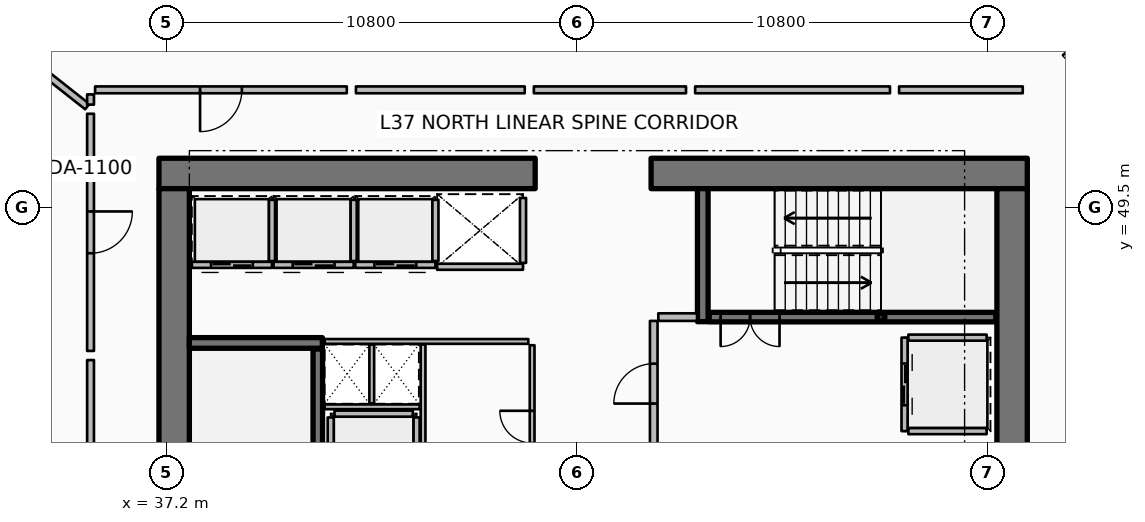
"""IFC4 building model, lengths in metres.
Left out: names, types, materials, properties, quantities, classifications, styles, units other than length and angle.
Written with IfcOpenShell. Run it as: python <this file> out.ifc"""

import sys

from ifc_helpers import new_model, si_unit, direction, frame, frame_2d, origin, origin_2d, place, context, subcontext, project, spatial, rectangle, hollow_rectangle, extrude, element, fill, save


model = new_model("IFC4")
c1 = context("Model", 3, precision=1e-05, world=origin(), true_north=direction((0.0, 1.0)))
c2 = subcontext(c1, "Body", "Model", "MODEL_VIEW")
j1 = project(units=[si_unit("LENGTHUNIT", "METRE"), si_unit("PLANEANGLEUNIT", "RADIAN")], contexts=[c1])
p1 = place(None, origin())
s1 = spatial("IfcSite", under=j1, at=p1, CompositionType="ELEMENT")
p2 = place(p1, origin())
s2 = spatial("IfcBuilding", under=s1, at=p2, CompositionType="ELEMENT")
p3 = place(p2, frame((0.0, 0.0, 150.3)))
s3 = spatial("IfcBuildingStorey", under=s2, at=p3, CompositionType="ELEMENT", Elevation=150.3)
p4 = place(p3, frame((37.0, 50.4, 0.0), z_axis=(0.0, 0.0, 1.0), x_axis=(1.0, 0.0, 0.0)))
e1 = element("IfcWall", 1, at=p4, inside=s3, PredefinedType="SHEAR", context=c2, shape_type="SweptSolid", body=[
    extrude(rectangle(XDim=9.9, YDim=0.8, at=frame_2d((4.95, 0.0))), origin(), (0.0, 0.0, 1.0), 3.75),
])
p5 = place(p3, frame((49.95, 50.4, 0.0), z_axis=(0.0, 0.0, 1.0), x_axis=(1.0, 0.0, 0.0)))
e2 = element("IfcWall", 2, at=p5, inside=s3, PredefinedType="SHEAR", context=c2, shape_type="SweptSolid", body=[
    extrude(rectangle(XDim=9.9, YDim=0.8, at=frame_2d((4.95, 0.0))), origin(), (0.0, 0.0, 1.0), 3.75),
])
for number, where, z_axis, x_axis in (
    (3, (37.4, 34.0, 0.0), (0.0, 0.0, 1.0), (0.0, 1.0, 0.0)),
    (4, (59.45, 34.0, 0.0), (0.0, 0.0, 1.0), (0.0, 1.0, 0.0)),
):
    element("IfcWall", number, at=place(p3, frame(where, z_axis=z_axis, x_axis=x_axis)), inside=s3, PredefinedType="SHEAR", context=c2, shape_type="SweptSolid", body=[
        extrude(rectangle(XDim=16.0, YDim=0.8, at=frame_2d((8.0, 0.0))), origin(), (0.0, 0.0, 1.0), 3.75),
    ])
for number, where, z_axis, x_axis in (
    (5, (37.8, 45.94, 0.0), (0.0, 0.0, 1.0), (1.0, 0.0, 0.0)),
    (6, (51.31, 46.5, 0.0), (0.0, 0.0, 1.0), (0.0, 1.0, 0.0)),
):
    element("IfcWall", number, at=place(p3, frame(where, z_axis=z_axis, x_axis=x_axis)), inside=s3, PredefinedType="SHEAR", context=c2, shape_type="SweptSolid", body=[
        extrude(rectangle(XDim=3.5, YDim=0.28, at=frame_2d((1.75, 0.0))), origin(), (0.0, 0.0, 1.0), 3.75),
    ])
p6 = place(p3, frame((56.0, 46.62, 0.0), z_axis=(0.0, 0.0, 1.0), x_axis=(1.0, 0.0, 0.0)))
e7 = element("IfcColumn", 7, at=p6, inside=s3, PredefinedType="COLUMN", context=c2, shape_type="SweptSolid", body=[
    extrude(hollow_rectangle(XDim=0.2, YDim=0.2, WallThickness=0.01, InnerFilletRadius=0.01, OuterFilletRadius=0.02, at=origin_2d()), origin(), (0.0, 0.0, 1.0), 1.67),
])
p7 = place(p3, frame((41.18, 38.22, 0.0), z_axis=(0.0, 0.0, 1.0), x_axis=(0.0, 1.0, 0.0)))
e8 = element("IfcWall", 8, at=p7, inside=s3, PredefinedType="SOLIDWALL", context=c2, shape_type="SweptSolid", body=[
    extrude(rectangle(XDim=7.56, YDim=0.25, at=frame_2d((3.78, 0.0))), origin(), (0.0, 0.0, 1.0), 3.5),
])
p8 = place(p7, frame((0.3, 0.0, 0.0)))
e9 = element("IfcOpeningElement", 9, at=p8, cuts=e8, PredefinedType="OPENING", context=c2, shape_type="SweptSolid", body=[
    extrude(rectangle(XDim=1.55, YDim=2.15, at=frame_2d((0.775, 1.075))), frame((0.0, 0.135, 0.0), z_axis=(0.0, -1.0, 0.0), x_axis=(1.0, 0.0, 0.0)), (0.0, 0.0, 1.0), 0.27),
])
p9 = place(p3, frame((51.48, 46.62, 0.0), z_axis=(0.0, 0.0, 1.0), x_axis=(1.0, 0.0, 0.0)))
e10 = element("IfcWall", 10, at=p9, inside=s3, PredefinedType="SOLIDWALL", context=c2, shape_type="SweptSolid", body=[
    extrude(rectangle(XDim=7.54, YDim=0.25, at=frame_2d((3.77, 0.0))), origin(), (0.0, 0.0, 1.0), 3.5),
])
p10 = place(p9, frame((0.3, 0.0, 0.0)))
e11 = element("IfcOpeningElement", 11, at=p10, cuts=e10, PredefinedType="OPENING", context=c2, shape_type="SweptSolid", body=[
    extrude(rectangle(XDim=1.55, YDim=2.15, at=frame_2d((0.775, 1.075))), frame((0.0, 0.135, 0.0), z_axis=(0.0, -1.0, 0.0), x_axis=(1.0, 0.0, 0.0)), (0.0, 0.0, 1.0), 0.27),
])
p11 = place(p3, frame((39.975, 47.995, 0.0), z_axis=(0.0, 0.0, 1.0), x_axis=(-1.0, 0.0, 0.0)))
e12 = element("IfcWall", 12, at=p11, inside=s3, PredefinedType="PARTITIONING", context=c2, shape_type="SweptSolid", body=[
    extrude(rectangle(XDim=2.11, YDim=0.16, at=frame_2d((1.055, 0.0))), origin(), (0.0, 0.0, 1.0), 3.5),
])
p12 = place(p11, frame((0.505, 0.0, 0.0)))
e13 = element("IfcOpeningElement", 13, at=p12, cuts=e12, PredefinedType="OPENING", context=c2, shape_type="SweptSolid", body=[
    extrude(rectangle(XDim=1.1, YDim=2.1, at=frame_2d((0.55, 1.05))), frame((0.0, 0.09, 0.0), z_axis=(0.0, -1.0, 0.0), x_axis=(1.0, 0.0, 0.0)), (0.0, 0.0, 1.0), 0.18),
])
p13 = place(p3, frame((39.975, 48.095, 0.0), z_axis=(0.0, 0.0, 1.0), x_axis=(0.0, 1.0, 0.0)))
e14 = element("IfcWall", 14, at=p13, inside=s3, PredefinedType="PARTITIONING", context=c2, shape_type="SweptSolid", body=[
    extrude(rectangle(XDim=1.61, YDim=0.16, at=frame_2d((0.805, 0.0))), origin(), (0.0, 0.0, 1.0), 3.5),
])
p14 = place(p3, frame((42.125, 47.995, 0.0), z_axis=(0.0, 0.0, 1.0), x_axis=(-1.0, 0.0, 0.0)))
e15 = element("IfcWall", 15, at=p14, inside=s3, PredefinedType="PARTITIONING", context=c2, shape_type="SweptSolid", body=[
    extrude(rectangle(XDim=2.11, YDim=0.16, at=frame_2d((1.055, 0.0))), origin(), (0.0, 0.0, 1.0), 3.5),
])
p15 = place(p14, frame((0.505, 0.0, 0.0)))
e16 = element("IfcOpeningElement", 16, at=p15, cuts=e15, PredefinedType="OPENING", context=c2, shape_type="SweptSolid", body=[
    extrude(rectangle(XDim=1.1, YDim=2.1, at=frame_2d((0.55, 1.05))), frame((0.0, 0.09, 0.0), z_axis=(0.0, -1.0, 0.0), x_axis=(1.0, 0.0, 0.0)), (0.0, 0.0, 1.0), 0.18),
])
p16 = place(p3, frame((42.125, 48.095, 0.0), z_axis=(0.0, 0.0, 1.0), x_axis=(0.0, 1.0, 0.0)))
e17 = element("IfcWall", 17, at=p16, inside=s3, PredefinedType="PARTITIONING", context=c2, shape_type="SweptSolid", body=[
    extrude(rectangle(XDim=1.61, YDim=0.16, at=frame_2d((0.805, 0.0))), origin(), (0.0, 0.0, 1.0), 3.5),
])
p17 = place(p3, frame((44.275, 47.995, 0.0), z_axis=(0.0, 0.0, 1.0), x_axis=(-1.0, 0.0, 0.0)))
e18 = element("IfcWall", 18, at=p17, inside=s3, PredefinedType="PARTITIONING", context=c2, shape_type="SweptSolid", body=[
    extrude(rectangle(XDim=2.11, YDim=0.16, at=frame_2d((1.055, 0.0))), origin(), (0.0, 0.0, 1.0), 3.5),
])
p18 = place(p17, frame((0.505, 0.0, 0.0)))
e19 = element("IfcOpeningElement", 19, at=p18, cuts=e18, PredefinedType="OPENING", context=c2, shape_type="SweptSolid", body=[
    extrude(rectangle(XDim=1.1, YDim=2.1, at=frame_2d((0.55, 1.05))), frame((0.0, 0.09, 0.0), z_axis=(0.0, -1.0, 0.0), x_axis=(1.0, 0.0, 0.0)), (0.0, 0.0, 1.0), 0.18),
])
p19 = place(p3, frame((44.275, 48.095, 0.0), z_axis=(0.0, 0.0, 1.0), x_axis=(0.0, 1.0, 0.0)))
e20 = element("IfcWall", 20, at=p19, inside=s3, PredefinedType="PARTITIONING", context=c2, shape_type="SweptSolid", body=[
    extrude(rectangle(XDim=1.61, YDim=0.16, at=frame_2d((0.805, 0.0))), origin(), (0.0, 0.0, 1.0), 3.5),
])
p20 = place(p3, frame((46.58, 47.945, 0.0), z_axis=(0.0, 0.0, 1.0), x_axis=(-1.0, 0.0, 0.0)))
e21 = element("IfcWall", 21, at=p20, inside=s3, PredefinedType="PARTITIONING", context=c2, shape_type="SweptSolid", body=[
    extrude(rectangle(XDim=2.26, YDim=0.16, at=frame_2d((1.13, 0.0))), origin(), (0.0, 0.0, 1.0), 3.5),
])
p21 = place(p3, frame((46.58, 48.045, 0.0), z_axis=(0.0, 0.0, 1.0), x_axis=(0.0, 1.0, 0.0)))
e22 = element("IfcWall", 22, at=p21, inside=s3, PredefinedType="PARTITIONING", context=c2, shape_type="SweptSolid", body=[
    extrude(rectangle(XDim=1.71, YDim=0.16, at=frame_2d((0.855, 0.0))), origin(), (0.0, 0.0, 1.0), 3.5),
])
for number, where, z_axis, x_axis in (
    (23, (43.78, 41.72, 0.0), (0.0, 0.0, 1.0), (0.0, 1.0, 0.0)),
    (24, (41.52, 41.72, 0.0), (0.0, 0.0, 1.0), (0.0, 1.0, 0.0)),
):
    element("IfcWall", number, at=place(p3, frame(where, z_axis=z_axis, x_axis=x_axis)), inside=s3, PredefinedType="PARTITIONING", context=c2, shape_type="SweptSolid", body=[
        extrude(rectangle(XDim=2.26, YDim=0.16, at=frame_2d((1.13, 0.0))), origin(), (0.0, 0.0, 1.0), 3.5),
    ])
p22 = place(p3, frame((41.62, 44.08, 0.0), z_axis=(0.0, 0.0, 1.0), x_axis=(1.0, 0.0, 0.0)))
e25 = element("IfcWall", 25, at=p22, inside=s3, PredefinedType="PARTITIONING", context=c2, shape_type="SweptSolid", body=[
    extrude(rectangle(XDim=2.06, YDim=0.16, at=frame_2d((1.03, 0.0))), origin(), (0.0, 0.0, 1.0), 3.5),
])
p23 = place(p3, frame((56.62, 46.08, 0.0), z_axis=(0.0, 0.0, 1.0), x_axis=(0.0, -1.0, 0.0)))
e26 = element("IfcWall", 26, at=p23, inside=s3, PredefinedType="PARTITIONING", context=c2, shape_type="SweptSolid", body=[
    extrude(rectangle(XDim=2.46, YDim=0.16, at=frame_2d((1.23, 0.0))), origin(), (0.0, 0.0, 1.0), 3.5),
])
p24 = place(p23, frame((0.68, 0.0, 0.0)))
e27 = element("IfcOpeningElement", 27, at=p24, cuts=e26, PredefinedType="OPENING", context=c2, shape_type="SweptSolid", body=[
    extrude(rectangle(XDim=1.1, YDim=2.1, at=frame_2d((0.55, 1.05))), frame((0.0, 0.09, 0.0), z_axis=(0.0, -1.0, 0.0), x_axis=(1.0, 0.0, 0.0)), (0.0, 0.0, 1.0), 0.18),
])
for number, where, z_axis, x_axis in (
    (28, (56.72, 46.08, 0.0), (0.0, 0.0, 1.0), (1.0, 0.0, 0.0)),
    (29, (56.72, 43.62, 0.0), (0.0, 0.0, 1.0), (1.0, 0.0, 0.0)),
):
    element("IfcWall", number, at=place(p3, frame(where, z_axis=z_axis, x_axis=x_axis)), inside=s3, PredefinedType="PARTITIONING", context=c2, shape_type="SweptSolid", body=[
        extrude(rectangle(XDim=2.06, YDim=0.16, at=frame_2d((1.03, 0.0))), origin(), (0.0, 0.0, 1.0), 3.5),
    ])
p25 = place(p3, frame((50.14, 46.62, 0.0), z_axis=(0.0, 0.0, 1.0), x_axis=(1.0, 0.0, 0.0)))
e30 = element("IfcWall", 30, at=p25, inside=s3, PredefinedType="PARTITIONING", context=c2, shape_type="SweptSolid", body=[
    extrude(rectangle(XDim=1.02, YDim=0.2, at=frame_2d((0.51, 0.0))), origin(), (0.0, 0.0, 1.0), 3.5),
])
p26 = place(p3, frame((50.02, 43.22, 0.0), z_axis=(0.0, 0.0, 1.0), x_axis=(0.0, 1.0, 0.0)))
e31 = element("IfcWall", 31, at=p26, inside=s3, PredefinedType="PARTITIONING", context=c2, shape_type="SweptSolid", body=[
    extrude(rectangle(XDim=3.3, YDim=0.2, at=frame_2d((1.65, 0.0))), origin(), (0.0, 0.0, 1.0), 3.5),
])
p27 = place(p26, frame((1.125, 0.0, 0.0)))
e32 = element("IfcOpeningElement", 32, at=p27, cuts=e31, PredefinedType="OPENING", context=c2, shape_type="SweptSolid", body=[
    extrude(rectangle(XDim=1.05, YDim=2.1, at=frame_2d((0.525, 1.05))), frame((0.0, 0.11, 0.0), z_axis=(0.0, -1.0, 0.0), x_axis=(1.0, 0.0, 0.0)), (0.0, 0.0, 1.0), 0.22),
])
p28 = place(p3, frame((41.36, 45.98, 0.0), z_axis=(0.0, 0.0, 1.0), x_axis=(1.0, 0.0, 0.0)))
e33 = element("IfcWall", 33, at=p28, inside=s3, PredefinedType="PARTITIONING", context=c2, shape_type="SweptSolid", body=[
    extrude(rectangle(XDim=5.36, YDim=0.125, at=frame_2d((2.68, 0.0))), origin(), (0.0, 0.0, 1.0), 2.94),
])
p29 = place(p3, frame((41.36, 44.26, 0.0), z_axis=(0.0, 0.0, 1.0), x_axis=(1.0, 0.0, 0.0)))
e34 = element("IfcWall", 34, at=p29, inside=s3, PredefinedType="PARTITIONING", context=c2, shape_type="SweptSolid", body=[
    extrude(rectangle(XDim=2.5, YDim=0.125, at=frame_2d((1.25, 0.0))), origin(), (0.0, 0.0, 1.0), 2.94),
])
p30 = place(p3, frame((42.6, 44.35, 0.0), z_axis=(0.0, 0.0, 1.0), x_axis=(0.0, 1.0, 0.0)))
e35 = element("IfcWall", 35, at=p30, inside=s3, PredefinedType="PARTITIONING", context=c2, shape_type="SweptSolid", body=[
    extrude(rectangle(XDim=1.55, YDim=0.125, at=frame_2d((0.775, 0.0))), origin(), (0.0, 0.0, 1.0), 2.94),
])
p31 = place(p3, frame((43.95, 41.58, 0.0), z_axis=(0.0, 0.0, 1.0), x_axis=(0.0, 1.0, 0.0)))
e36 = element("IfcWall", 36, at=p31, inside=s3, PredefinedType="PARTITIONING", context=c2, shape_type="SweptSolid", body=[
    extrude(rectangle(XDim=4.32, YDim=0.125, at=frame_2d((2.16, 0.0))), origin(), (0.0, 0.0, 1.0), 2.94),
])
p32 = place(p3, frame((46.82, 41.58, 0.0), z_axis=(0.0, 0.0, 1.0), x_axis=(0.0, 1.0, 0.0)))
e37 = element("IfcWall", 37, at=p32, inside=s3, PredefinedType="PARTITIONING", context=c2, shape_type="SweptSolid", body=[
    extrude(rectangle(XDim=4.3, YDim=0.125, at=frame_2d((2.15, 0.0))), origin(), (0.0, 0.0, 1.0), 2.94),
])
p33 = place(p32, frame((1.725, 0.0, 0.0)))
e38 = element("IfcOpeningElement", 38, at=p33, cuts=e37, PredefinedType="OPENING", context=c2, shape_type="SweptSolid", body=[
    extrude(rectangle(XDim=0.85, YDim=2.06, at=frame_2d((0.425, 1.03))), frame((0.0, 0.073, 0.0), z_axis=(0.0, -1.0, 0.0), x_axis=(1.0, 0.0, 0.0)), (0.0, 0.0, 1.0), 0.145),
])
p34 = place(p3, frame((35.114, 52.159, 0.0), z_axis=(0.0, 0.0, 1.0), x_axis=(-0.78531739611, 0.619093359169, 0.0)))
e39 = element("IfcWall", 39, at=p34, inside=s3, PredefinedType="PARTITIONING", context=c2, shape_type="SweptSolid", body=[
    extrude(rectangle(XDim=7.43, YDim=0.18, at=frame_2d((3.715, 0.0))), origin(), (0.0, 0.0, 1.0), 2.94),
])
p35 = place(p3, frame((35.2, 51.971, 0.0), z_axis=(0.0, 0.0, 1.0), x_axis=(0.0, -1.0, 0.0)))
e40 = element("IfcWall", 40, at=p35, inside=s3, PredefinedType="PARTITIONING", context=c2, shape_type="SweptSolid", body=[
    extrude(rectangle(XDim=6.241, YDim=0.18, at=frame_2d((3.12, 0.0))), origin(), (0.0, 0.0, 1.0), 2.94),
])
p36 = place(p35, frame((2.57, 0.0, 0.0)))
e41 = element("IfcOpeningElement", 41, at=p36, cuts=e40, PredefinedType="OPENING", context=c2, shape_type="SweptSolid", body=[
    extrude(rectangle(XDim=1.1, YDim=2.1, at=frame_2d((0.55, 1.05))), frame((0.0, 0.1, 0.0), z_axis=(0.0, -1.0, 0.0), x_axis=(1.0, 0.0, 0.0)), (0.0, 0.0, 1.0), 0.2),
])
p37 = place(p3, frame((35.2, 45.49, 0.0), z_axis=(0.0, 0.0, 1.0), x_axis=(0.0, -1.0, 0.0)))
e42 = element("IfcWall", 42, at=p37, inside=s3, PredefinedType="PARTITIONING", context=c2, shape_type="SweptSolid", body=[
    extrude(rectangle(XDim=4.885, YDim=0.18, at=frame_2d((2.442, 0.0))), origin(), (0.0, 0.0, 1.0), 2.94),
])
p38 = place(p3, frame((41.944, 52.6, 0.0), z_axis=(0.0, 0.0, 1.0), x_axis=(-1.0, 0.0, 0.0)))
e43 = element("IfcWall", 43, at=p38, inside=s3, PredefinedType="PARTITIONING", context=c2, shape_type="SweptSolid", body=[
    extrude(rectangle(XDim=6.624, YDim=0.18, at=frame_2d((3.312, 0.0))), origin(), (0.0, 0.0, 1.0), 2.94),
])
p39 = place(p38, frame((2.762, 0.0, 0.0)))
e44 = element("IfcOpeningElement", 44, at=p39, cuts=e43, PredefinedType="OPENING", context=c2, shape_type="SweptSolid", body=[
    extrude(rectangle(XDim=1.1, YDim=2.1, at=frame_2d((0.55, 1.05))), frame((0.0, 0.1, 0.0), z_axis=(0.0, -1.0, 0.0), x_axis=(1.0, 0.0, 0.0)), (0.0, 0.0, 1.0), 0.2),
])
p40 = place(p3, frame((35.2, 52.48, 0.0), z_axis=(0.0, 0.0, 1.0), x_axis=(0.0, -1.0, 0.0)))
e45 = element("IfcWall", 45, at=p40, inside=s3, PredefinedType="PARTITIONING", context=c2, shape_type="SweptSolid", body=[
    extrude(rectangle(XDim=0.269, YDim=0.18, at=frame_2d((0.135, 0.0))), origin(), (0.0, 0.0, 1.0), 2.94),
])
p41 = place(p3, frame((59.73, 52.6, 0.0), z_axis=(0.0, 0.0, 1.0), x_axis=(-1.0, 0.0, 0.0)))
e46 = element("IfcWall", 46, at=p41, inside=s3, PredefinedType="PARTITIONING", context=c2, shape_type="SweptSolid", body=[
    extrude(rectangle(XDim=3.254, YDim=0.18, at=frame_2d((1.627, 0.0))), origin(), (0.0, 0.0, 1.0), 2.94),
])
p42 = place(p3, frame((64.017, 51.093, 0.0), z_axis=(0.0, 0.0, 1.0), x_axis=(-0.649447060425, 0.76040680935, 0.0)))
e47 = element("IfcWall", 47, at=p42, inside=s3, PredefinedType="PARTITIONING", context=c2, shape_type="SweptSolid", body=[
    extrude(rectangle(XDim=6.975, YDim=0.125, at=frame_2d((3.487, 0.0))), origin(), (0.0, 0.0, 1.0), 2.94),
])
p43 = place(p42, frame((3.037, 0.0, 0.0)))
e48 = element("IfcOpeningElement", 48, at=p43, cuts=e47, PredefinedType="OPENING", context=c2, shape_type="SweptSolid", body=[
    extrude(rectangle(XDim=0.9, YDim=2.08, at=frame_2d((0.45, 1.04))), frame((0.0, 0.073, 0.0), z_axis=(0.0, -1.0, 0.0), x_axis=(1.0, 0.0, 0.0)), (0.0, 0.0, 1.0), 0.145),
])
p44 = place(p3, frame((56.236, 52.6, 0.0), z_axis=(0.0, 0.0, 1.0), x_axis=(-1.0, 0.0, 0.0)))
e49 = element("IfcWall", 49, at=p44, inside=s3, PredefinedType="PARTITIONING", context=c2, shape_type="SweptSolid", body=[
    extrude(rectangle(XDim=5.127, YDim=0.18, at=frame_2d((2.563, 0.0))), origin(), (0.0, 0.0, 1.0), 2.94),
])
p45 = place(p3, frame((50.869, 52.6, 0.0), z_axis=(0.0, 0.0, 1.0), x_axis=(-1.0, 0.0, 0.0)))
e50 = element("IfcWall", 50, at=p45, inside=s3, PredefinedType="PARTITIONING", context=c2, shape_type="SweptSolid", body=[
    extrude(rectangle(XDim=4.004, YDim=0.18, at=frame_2d((2.002, 0.0))), origin(), (0.0, 0.0, 1.0), 2.94),
])
p46 = place(p3, frame((46.625, 52.6, 0.0), z_axis=(0.0, 0.0, 1.0), x_axis=(-1.0, 0.0, 0.0)))
e51 = element("IfcWall", 51, at=p46, inside=s3, PredefinedType="PARTITIONING", context=c2, shape_type="SweptSolid", body=[
    extrude(rectangle(XDim=4.442, YDim=0.18, at=frame_2d((2.221, 0.0))), origin(), (0.0, 0.0, 1.0), 2.94),
])
p47 = place(p10, origin())
e52 = element("IfcDoor", 52, at=p47, inside=s3, OperationType="DOUBLE_DOOR_SINGLE_SWING", PredefinedType="DOOR", context=c2, shape_type="SweptSolid", body=[
    extrude(rectangle(XDim=1.55, YDim=2.15, at=frame_2d((0.775, 1.075))), frame((0.0, 0.025, 0.0), z_axis=(0.0, -1.0, 0.0), x_axis=(1.0, 0.0, 0.0)), (0.0, 0.0, 1.0), 0.05),
])
fill(e11, e52)
p48 = place(p12, origin())
e53 = element("IfcDoor", 53, at=p48, inside=s3, OperationType="DOUBLE_DOOR_SLIDING", PredefinedType="DOOR", context=c2, shape_type="SweptSolid", body=[
    extrude(rectangle(XDim=1.1, YDim=2.1, at=frame_2d((0.55, 1.05))), frame((0.0, 0.025, 0.0), z_axis=(0.0, -1.0, 0.0), x_axis=(1.0, 0.0, 0.0)), (0.0, 0.0, 1.0), 0.05),
])
fill(e13, e53)
p49 = place(p15, origin())
e54 = element("IfcDoor", 54, at=p49, inside=s3, OperationType="DOUBLE_DOOR_SLIDING", PredefinedType="DOOR", context=c2, shape_type="SweptSolid", body=[
    extrude(rectangle(XDim=1.1, YDim=2.1, at=frame_2d((0.55, 1.05))), frame((0.0, 0.025, 0.0), z_axis=(0.0, -1.0, 0.0), x_axis=(1.0, 0.0, 0.0)), (0.0, 0.0, 1.0), 0.05),
])
fill(e16, e54)
p50 = place(p18, origin())
e55 = element("IfcDoor", 55, at=p50, inside=s3, OperationType="DOUBLE_DOOR_SLIDING", PredefinedType="DOOR", context=c2, shape_type="SweptSolid", body=[
    extrude(rectangle(XDim=1.1, YDim=2.1, at=frame_2d((0.55, 1.05))), frame((0.0, 0.025, 0.0), z_axis=(0.0, -1.0, 0.0), x_axis=(1.0, 0.0, 0.0)), (0.0, 0.0, 1.0), 0.05),
])
fill(e19, e55)
p51 = place(p24, origin())
e56 = element("IfcDoor", 56, at=p51, inside=s3, OperationType="DOUBLE_DOOR_SLIDING", PredefinedType="DOOR", context=c2, shape_type="SweptSolid", body=[
    extrude(rectangle(XDim=1.1, YDim=2.1, at=frame_2d((0.55, 1.05))), frame((0.0, 0.025, 0.0), z_axis=(0.0, -1.0, 0.0), x_axis=(1.0, 0.0, 0.0)), (0.0, 0.0, 1.0), 0.05),
])
fill(e27, e56)
p52 = place(p27, origin())
e57 = element("IfcDoor", 57, at=p52, inside=s3, OperationType="SINGLE_SWING_LEFT", PredefinedType="DOOR", context=c2, shape_type="SweptSolid", body=[
    extrude(rectangle(XDim=1.05, YDim=2.1, at=frame_2d((0.525, 1.05))), frame((0.0, 0.025, 0.0), z_axis=(0.0, -1.0, 0.0), x_axis=(1.0, 0.0, 0.0)), (0.0, 0.0, 1.0), 0.05),
])
fill(e32, e57)
p53 = place(p33, origin())
e58 = element("IfcDoor", 58, at=p53, inside=s3, OperationType="SINGLE_SWING_RIGHT", PredefinedType="DOOR", context=c2, shape_type="SweptSolid", body=[
    extrude(rectangle(XDim=0.85, YDim=2.06, at=frame_2d((0.425, 1.03))), frame((0.0, 0.025, 0.0), z_axis=(0.0, -1.0, 0.0), x_axis=(1.0, 0.0, 0.0)), (0.0, 0.0, 1.0), 0.05),
])
fill(e38, e58)
p54 = place(p36, origin())
e59 = element("IfcDoor", 59, at=p54, inside=s3, OperationType="SINGLE_SWING_LEFT", PredefinedType="DOOR", context=c2, shape_type="SweptSolid", body=[
    extrude(rectangle(XDim=1.1, YDim=2.1, at=frame_2d((0.55, 1.05))), frame((0.0, 0.025, 0.0), z_axis=(0.0, -1.0, 0.0), x_axis=(1.0, 0.0, 0.0)), (0.0, 0.0, 1.0), 0.05),
])
fill(e41, e59)
p55 = place(p39, origin())
e60 = element("IfcDoor", 60, at=p55, inside=s3, OperationType="SINGLE_SWING_RIGHT", PredefinedType="DOOR", context=c2, shape_type="SweptSolid", body=[
    extrude(rectangle(XDim=1.1, YDim=2.1, at=frame_2d((0.55, 1.05))), frame((0.0, 0.025, 0.0), z_axis=(0.0, -1.0, 0.0), x_axis=(1.0, 0.0, 0.0)), (0.0, 0.0, 1.0), 0.05),
])
fill(e44, e60)
save(model, sys.argv[1])
